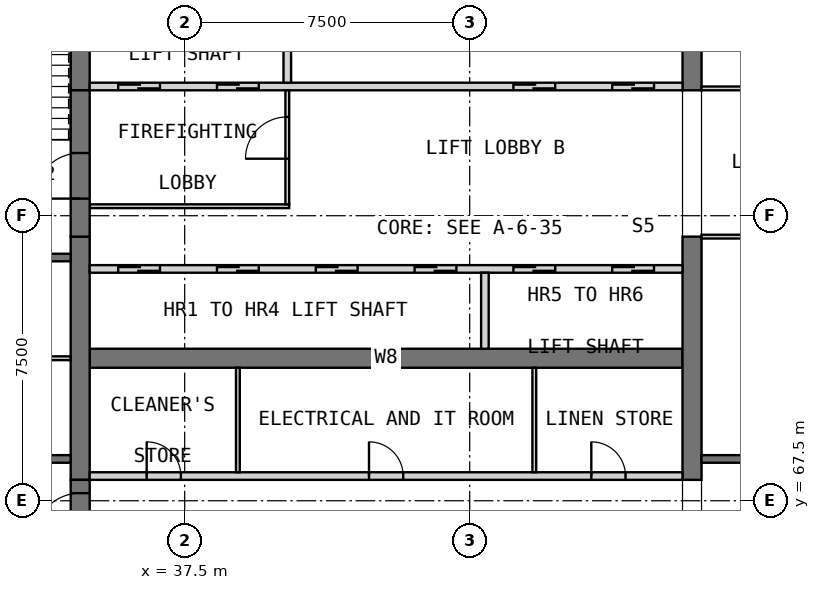
"""IFC4 building model, lengths in metres.
Left out: names, types, materials, properties, quantities, classifications, styles, units other than length and angle.
Written with IfcOpenShell. Run it as: python <this file> out.ifc"""

import sys

from ifc_helpers import new_model, si_unit, direction, frame, frame_2d, origin, place, context, subcontext, project, spatial, rectangle, extrude, element, fill, save


model = new_model("IFC4")
c1 = context("Model", 3, precision=1e-05, world=origin(), true_north=direction((0.0, 1.0)))
c2 = subcontext(c1, "Body", "Model", "MODEL_VIEW")
j1 = project(units=[si_unit("LENGTHUNIT", "METRE"), si_unit("PLANEANGLEUNIT", "RADIAN")], contexts=[c1])
p1 = place(None, origin())
s1 = spatial("IfcSite", under=j1, at=p1, CompositionType="ELEMENT")
p2 = place(p1, origin())
s2 = spatial("IfcBuilding", under=s1, at=p2, CompositionType="ELEMENT")
p3 = place(p2, frame((0.0, 0.0, 266.2)))
s3 = spatial("IfcBuildingStorey", under=s2, at=p3, CompositionType="ELEMENT", Elevation=266.2)
p4 = place(p3, frame((35.0, 71.25, 0.0), z_axis=(0.0, 0.0, 1.0), x_axis=(1.0, 0.0, 0.0)))
e1 = element("IfcWall", 1, at=p4, inside=s3, PredefinedType="SHEAR", context=c2, shape_type="SweptSolid", body=[
    extrude(rectangle(XDim=15.6, YDim=0.5, at=frame_2d((7.8, 0.0))), origin(), (0.0, 0.0, 1.0), 3.5),
])
p5 = place(p3, frame((34.75, 68.05, 0.0), z_axis=(0.0, 0.0, 1.0), x_axis=(0.0, 1.0, 0.0)))
e2 = element("IfcWall", 2, at=p5, inside=s3, PredefinedType="SHEAR", context=c2, shape_type="SweptSolid", body=[
    extrude(rectangle(XDim=6.4, YDim=0.5, at=frame_2d((3.2, 0.0))), origin(), (0.0, 0.0, 1.0), 3.5),
])
p6 = place(p3, frame((34.75, 78.3, 0.0), z_axis=(0.0, 0.0, 1.0), x_axis=(0.0, 1.0, 0.0)))
e3 = element("IfcWall", 3, at=p6, inside=s3, PredefinedType="SHEAR", context=c2, shape_type="SweptSolid", body=[
    extrude(rectangle(XDim=3.6, YDim=0.5, at=frame_2d((1.8, 0.0))), origin(), (0.0, 0.0, 1.0), 3.5),
])
p7 = place(p3, frame((50.85, 68.05, 0.0), z_axis=(0.0, 0.0, 1.0), x_axis=(0.0, 1.0, 0.0)))
e4 = element("IfcWall", 4, at=p7, inside=s3, PredefinedType="SHEAR", context=c2, shape_type="SweptSolid", body=[
    extrude(rectangle(XDim=6.4, YDim=0.5, at=frame_2d((3.2, 0.0))), origin(), (0.0, 0.0, 1.0), 3.5),
])
p8 = place(p3, frame((50.85, 78.3, 0.0), z_axis=(0.0, 0.0, 1.0), x_axis=(0.0, 1.0, 0.0)))
e5 = element("IfcWall", 5, at=p8, inside=s3, PredefinedType="SHEAR", context=c2, shape_type="SweptSolid", body=[
    extrude(rectangle(XDim=3.6, YDim=0.5, at=frame_2d((1.8, 0.0))), origin(), (0.0, 0.0, 1.0), 3.5),
])
p9 = place(p3, frame((35.0, 68.15, 0.0), z_axis=(0.0, 0.0, 1.0), x_axis=(1.0, 0.0, 0.0)))
e6 = element("IfcWall", 6, at=p9, inside=s3, PredefinedType="PARTITIONING", context=c2, shape_type="SweptSolid", body=[
    extrude(rectangle(XDim=15.6, YDim=0.2, at=frame_2d((7.8, 0.0))), origin(), (0.0, 0.0, 1.0), 3.25),
])
p10 = place(p9, frame((1.5, 0.0, 0.0)))
e7 = element("IfcOpeningElement", 7, at=p10, cuts=e6, PredefinedType="OPENING", context=c2, shape_type="SweptSolid", body=[
    extrude(rectangle(XDim=0.9, YDim=2.1, at=frame_2d((0.45, 1.05))), frame((0.0, 0.11, 0.0), z_axis=(0.0, -1.0, 0.0), x_axis=(1.0, 0.0, 0.0)), (0.0, 0.0, 1.0), 0.22),
])
p11 = place(p9, frame((7.35, 0.0, 0.0)))
e8 = element("IfcOpeningElement", 8, at=p11, cuts=e6, PredefinedType="OPENING", context=c2, shape_type="SweptSolid", body=[
    extrude(rectangle(XDim=0.9, YDim=2.1, at=frame_2d((0.45, 1.05))), frame((0.0, 0.11, 0.0), z_axis=(0.0, -1.0, 0.0), x_axis=(1.0, 0.0, 0.0)), (0.0, 0.0, 1.0), 0.22),
])
p12 = place(p9, frame((13.2, 0.0, 0.0)))
e9 = element("IfcOpeningElement", 9, at=p12, cuts=e6, PredefinedType="OPENING", context=c2, shape_type="SweptSolid", body=[
    extrude(rectangle(XDim=0.9, YDim=2.1, at=frame_2d((0.45, 1.05))), frame((0.0, 0.11, 0.0), z_axis=(0.0, -1.0, 0.0), x_axis=(1.0, 0.0, 0.0)), (0.0, 0.0, 1.0), 0.22),
])
for number, where, z_axis, x_axis in (
    (10, (38.9, 68.25, 0.0), (0.0, 0.0, 1.0), (0.0, 1.0, 0.0)),
    (11, (46.7, 68.25, 0.0), (0.0, 0.0, 1.0), (0.0, 1.0, 0.0)),
):
    element("IfcWall", number, at=place(p3, frame(where, z_axis=z_axis, x_axis=x_axis)), inside=s3, PredefinedType="PARTITIONING", context=c2, shape_type="SweptSolid", body=[
        extrude(rectangle(XDim=2.75, YDim=0.1, at=frame_2d((1.375, 0.0))), origin(), (0.0, 0.0, 1.0), 3.25),
    ])
p13 = place(p3, frame((35.0, 73.6, 0.0), z_axis=(0.0, 0.0, 1.0), x_axis=(1.0, 0.0, 0.0)))
e12 = element("IfcWall", 12, at=p13, inside=s3, PredefinedType="SOLIDWALL", context=c2, shape_type="SweptSolid", body=[
    extrude(rectangle(XDim=15.6, YDim=0.2, at=frame_2d((7.8, 0.0))), origin(), (0.0, 0.0, 1.0), 3.5),
])
p14 = place(p13, frame((0.75, 0.0, 0.0)))
e13 = element("IfcOpeningElement", 13, at=p14, cuts=e12, PredefinedType="OPENING", context=c2, shape_type="SweptSolid", body=[
    extrude(rectangle(XDim=1.1, YDim=2.1, at=frame_2d((0.55, 1.05))), frame((0.0, 0.11, 0.0), z_axis=(0.0, -1.0, 0.0), x_axis=(1.0, 0.0, 0.0)), (0.0, 0.0, 1.0), 0.22),
])
p15 = place(p13, frame((3.35, 0.0, 0.0)))
e14 = element("IfcOpeningElement", 14, at=p15, cuts=e12, PredefinedType="OPENING", context=c2, shape_type="SweptSolid", body=[
    extrude(rectangle(XDim=1.1, YDim=2.1, at=frame_2d((0.55, 1.05))), frame((0.0, 0.11, 0.0), z_axis=(0.0, -1.0, 0.0), x_axis=(1.0, 0.0, 0.0)), (0.0, 0.0, 1.0), 0.22),
])
p16 = place(p13, frame((5.95, 0.0, 0.0)))
e15 = element("IfcOpeningElement", 15, at=p16, cuts=e12, PredefinedType="OPENING", context=c2, shape_type="SweptSolid", body=[
    extrude(rectangle(XDim=1.1, YDim=2.1, at=frame_2d((0.55, 1.05))), frame((0.0, 0.11, 0.0), z_axis=(0.0, -1.0, 0.0), x_axis=(1.0, 0.0, 0.0)), (0.0, 0.0, 1.0), 0.22),
])
p17 = place(p13, frame((8.55, 0.0, 0.0)))
e16 = element("IfcOpeningElement", 16, at=p17, cuts=e12, PredefinedType="OPENING", context=c2, shape_type="SweptSolid", body=[
    extrude(rectangle(XDim=1.1, YDim=2.1, at=frame_2d((0.55, 1.05))), frame((0.0, 0.11, 0.0), z_axis=(0.0, -1.0, 0.0), x_axis=(1.0, 0.0, 0.0)), (0.0, 0.0, 1.0), 0.22),
])
p18 = place(p13, frame((11.15, 0.0, 0.0)))
e17 = element("IfcOpeningElement", 17, at=p18, cuts=e12, PredefinedType="OPENING", context=c2, shape_type="SweptSolid", body=[
    extrude(rectangle(XDim=1.1, YDim=2.1, at=frame_2d((0.55, 1.05))), frame((0.0, 0.11, 0.0), z_axis=(0.0, -1.0, 0.0), x_axis=(1.0, 0.0, 0.0)), (0.0, 0.0, 1.0), 0.22),
])
p19 = place(p13, frame((13.75, 0.0, 0.0)))
e18 = element("IfcOpeningElement", 18, at=p19, cuts=e12, PredefinedType="OPENING", context=c2, shape_type="SweptSolid", body=[
    extrude(rectangle(XDim=1.1, YDim=2.1, at=frame_2d((0.55, 1.05))), frame((0.0, 0.11, 0.0), z_axis=(0.0, -1.0, 0.0), x_axis=(1.0, 0.0, 0.0)), (0.0, 0.0, 1.0), 0.22),
])
p20 = place(p3, frame((45.4, 71.5, 0.0), z_axis=(0.0, 0.0, 1.0), x_axis=(0.0, 1.0, 0.0)))
e19 = element("IfcWall", 19, at=p20, inside=s3, PredefinedType="SOLIDWALL", context=c2, shape_type="SweptSolid", body=[
    extrude(rectangle(XDim=2.0, YDim=0.2, at=frame_2d((1.0, 0.0))), origin(), (0.0, 0.0, 1.0), 3.5),
])
p21 = place(p3, frame((35.0, 78.4, 0.0), z_axis=(0.0, 0.0, 1.0), x_axis=(1.0, 0.0, 0.0)))
e20 = element("IfcWall", 20, at=p21, inside=s3, PredefinedType="SOLIDWALL", context=c2, shape_type="SweptSolid", body=[
    extrude(rectangle(XDim=15.6, YDim=0.2, at=frame_2d((7.8, 0.0))), origin(), (0.0, 0.0, 1.0), 3.5),
])
p22 = place(p21, frame((0.75, 0.0, 0.0)))
e21 = element("IfcOpeningElement", 21, at=p22, cuts=e20, PredefinedType="OPENING", context=c2, shape_type="SweptSolid", body=[
    extrude(rectangle(XDim=1.1, YDim=2.1, at=frame_2d((0.55, 1.05))), frame((0.0, 0.11, 0.0), z_axis=(0.0, -1.0, 0.0), x_axis=(1.0, 0.0, 0.0)), (0.0, 0.0, 1.0), 0.22),
])
p23 = place(p21, frame((3.35, 0.0, 0.0)))
e22 = element("IfcOpeningElement", 22, at=p23, cuts=e20, PredefinedType="OPENING", context=c2, shape_type="SweptSolid", body=[
    extrude(rectangle(XDim=1.1, YDim=2.1, at=frame_2d((0.55, 1.05))), frame((0.0, 0.11, 0.0), z_axis=(0.0, -1.0, 0.0), x_axis=(1.0, 0.0, 0.0)), (0.0, 0.0, 1.0), 0.22),
])
p24 = place(p21, frame((11.15, 0.0, 0.0)))
e23 = element("IfcOpeningElement", 23, at=p24, cuts=e20, PredefinedType="OPENING", context=c2, shape_type="SweptSolid", body=[
    extrude(rectangle(XDim=1.1, YDim=2.1, at=frame_2d((0.55, 1.05))), frame((0.0, 0.11, 0.0), z_axis=(0.0, -1.0, 0.0), x_axis=(1.0, 0.0, 0.0)), (0.0, 0.0, 1.0), 0.22),
])
p25 = place(p21, frame((13.75, 0.0, 0.0)))
e24 = element("IfcOpeningElement", 24, at=p25, cuts=e20, PredefinedType="OPENING", context=c2, shape_type="SweptSolid", body=[
    extrude(rectangle(XDim=1.1, YDim=2.1, at=frame_2d((0.55, 1.05))), frame((0.0, 0.11, 0.0), z_axis=(0.0, -1.0, 0.0), x_axis=(1.0, 0.0, 0.0)), (0.0, 0.0, 1.0), 0.22),
])
p26 = place(p3, frame((40.2, 78.5, 0.0), z_axis=(0.0, 0.0, 1.0), x_axis=(0.0, 1.0, 0.0)))
e25 = element("IfcWall", 25, at=p26, inside=s3, PredefinedType="SOLIDWALL", context=c2, shape_type="SweptSolid", body=[
    extrude(rectangle(XDim=3.4, YDim=0.2, at=frame_2d((1.7, 0.0))), origin(), (0.0, 0.0, 1.0), 3.5),
])
p27 = place(p3, frame((35.0, 75.25, 0.0), z_axis=(0.0, 0.0, 1.0), x_axis=(1.0, 0.0, 0.0)))
e26 = element("IfcWall", 26, at=p27, inside=s3, PredefinedType="PARTITIONING", context=c2, shape_type="SweptSolid", body=[
    extrude(rectangle(XDim=5.25, YDim=0.1, at=frame_2d((2.625, 0.0))), origin(), (0.0, 0.0, 1.0), 3.25),
])
p28 = place(p3, frame((40.2, 75.3, 0.0), z_axis=(0.0, 0.0, 1.0), x_axis=(0.0, 1.0, 0.0)))
e27 = element("IfcWall", 27, at=p28, inside=s3, PredefinedType="PARTITIONING", context=c2, shape_type="SweptSolid", body=[
    extrude(rectangle(XDim=3.0, YDim=0.1, at=frame_2d((1.5, 0.0))), origin(), (0.0, 0.0, 1.0), 3.25),
])
p29 = place(p28, frame((1.2, 0.0, 0.0)))
e28 = element("IfcOpeningElement", 28, at=p29, cuts=e27, PredefinedType="OPENING", context=c2, shape_type="SweptSolid", body=[
    extrude(rectangle(XDim=1.1, YDim=2.1, at=frame_2d((0.55, 1.05))), frame((0.0, 0.06, 0.0), z_axis=(0.0, -1.0, 0.0), x_axis=(1.0, 0.0, 0.0)), (0.0, 0.0, 1.0), 0.12),
])
p30 = place(p3, frame((34.75, 64.2, 0.0), z_axis=(0.0, 0.0, 1.0), x_axis=(0.0, 1.0, 0.0)))
e29 = element("IfcWall", 29, at=p30, inside=s3, PredefinedType="SOLIDWALL", context=c2, shape_type="SweptSolid", body=[
    extrude(rectangle(XDim=3.85, YDim=0.5, at=frame_2d((1.925, 0.0))), origin(), (0.0, 0.0, 1.0), 2.3),
])
p31 = place(p30, frame((2.3, 0.0, 0.0)))
e30 = element("IfcOpeningElement", 30, at=p31, cuts=e29, PredefinedType="OPENING", context=c2, shape_type="SweptSolid", body=[
    extrude(rectangle(XDim=1.2, YDim=2.1, at=frame_2d((0.6, 1.05))), frame((0.0, 0.26, 0.0), z_axis=(0.0, -1.0, 0.0), x_axis=(1.0, 0.0, 0.0)), (0.0, 0.0, 1.0), 0.52),
])
p32 = place(p3, frame((34.75, 74.45, 0.0), z_axis=(0.0, 0.0, 1.0), x_axis=(0.0, 1.0, 0.0)))
e31 = element("IfcWall", 31, at=p32, inside=s3, PredefinedType="SOLIDWALL", context=c2, shape_type="SweptSolid", body=[
    extrude(rectangle(XDim=3.85, YDim=0.5, at=frame_2d((1.925, 0.0))), origin(), (0.0, 0.0, 1.0), 2.3),
])
p33 = place(p32, frame((1.0, 0.0, 0.0)))
e32 = element("IfcOpeningElement", 32, at=p33, cuts=e31, PredefinedType="OPENING", context=c2, shape_type="SweptSolid", body=[
    extrude(rectangle(XDim=1.2, YDim=2.1, at=frame_2d((0.6, 1.05))), frame((0.0, 0.26, 0.0), z_axis=(0.0, -1.0, 0.0), x_axis=(1.0, 0.0, 0.0)), (0.0, 0.0, 1.0), 0.52),
])
p34 = place(p3, frame((30.6, 68.6, 0.0), z_axis=(0.0, 0.0, 1.0), x_axis=(1.0, 0.0, 0.0)))
e33 = element("IfcWall", 33, at=p34, inside=s3, PredefinedType="SOLIDWALL", context=c2, shape_type="SweptSolid", body=[
    extrude(rectangle(XDim=3.9, YDim=0.2, at=frame_2d((1.95, 0.0))), origin(), (0.0, 0.0, 1.0), 3.25),
])
p35 = place(p34, frame((1.7, 0.0, 0.0)))
e34 = element("IfcOpeningElement", 34, at=p35, cuts=e33, PredefinedType="OPENING", context=c2, shape_type="SweptSolid", body=[
    extrude(rectangle(XDim=0.9, YDim=2.1, at=frame_2d((0.45, 1.05))), frame((0.0, 0.11, 0.0), z_axis=(0.0, -1.0, 0.0), x_axis=(1.0, 0.0, 0.0)), (0.0, 0.0, 1.0), 0.22),
])
p36 = place(p3, frame((30.6, 73.9, 0.0), z_axis=(0.0, 0.0, 1.0), x_axis=(1.0, 0.0, 0.0)))
e35 = element("IfcWall", 35, at=p36, inside=s3, PredefinedType="SOLIDWALL", context=c2, shape_type="SweptSolid", body=[
    extrude(rectangle(XDim=3.9, YDim=0.2, at=frame_2d((1.95, 0.0))), origin(), (0.0, 0.0, 1.0), 3.25),
])
p37 = place(p36, frame((1.7, 0.0, 0.0)))
e36 = element("IfcOpeningElement", 36, at=p37, cuts=e35, PredefinedType="OPENING", context=c2, shape_type="SweptSolid", body=[
    extrude(rectangle(XDim=0.9, YDim=2.1, at=frame_2d((0.45, 1.05))), frame((0.0, 0.11, 0.0), z_axis=(0.0, -1.0, 0.0), x_axis=(1.0, 0.0, 0.0)), (0.0, 0.0, 1.0), 0.22),
])
p38 = place(p3, frame((51.1, 68.6, 0.0), z_axis=(0.0, 0.0, 1.0), x_axis=(1.0, 0.0, 0.0)))
e37 = element("IfcWall", 37, at=p38, inside=s3, PredefinedType="SOLIDWALL", context=c2, shape_type="SweptSolid", body=[
    extrude(rectangle(XDim=8.3, YDim=0.2, at=frame_2d((4.15, 0.0))), origin(), (0.0, 0.0, 1.0), 3.25),
])
p39 = place(p3, frame((30.6, 71.25, 0.0), z_axis=(0.0, 0.0, 1.0), x_axis=(1.0, 0.0, 0.0)))
e38 = element("IfcWall", 38, at=p39, inside=s3, PredefinedType="PARTITIONING", context=c2, shape_type="SweptSolid", body=[
    extrude(rectangle(XDim=3.9, YDim=0.1, at=frame_2d((1.95, 0.0))), origin(), (0.0, 0.0, 1.0), 3.25),
])
p40 = place(p3, frame((51.1, 74.45, 0.0), z_axis=(0.0, 0.0, 1.0), x_axis=(1.0, 0.0, 0.0)))
e39 = element("IfcWall", 39, at=p40, inside=s3, PredefinedType="PARTITIONING", context=c2, shape_type="SweptSolid", body=[
    extrude(rectangle(XDim=8.3, YDim=0.1, at=frame_2d((4.15, 0.0))), origin(), (0.0, 0.0, 1.0), 3.25),
])
p41 = place(p40, frame((3.7, 0.0, 0.0)))
e40 = element("IfcOpeningElement", 40, at=p41, cuts=e39, PredefinedType="OPENING", context=c2, shape_type="SweptSolid", body=[
    extrude(rectangle(XDim=0.9, YDim=2.1, at=frame_2d((0.45, 1.05))), frame((0.0, 0.06, 0.0), z_axis=(0.0, -1.0, 0.0), x_axis=(1.0, 0.0, 0.0)), (0.0, 0.0, 1.0), 0.12),
])
p42 = place(p3, frame((51.1, 78.35, 0.0), z_axis=(0.0, 0.0, 1.0), x_axis=(1.0, 0.0, 0.0)))
e41 = element("IfcWall", 41, at=p42, inside=s3, PredefinedType="PARTITIONING", context=c2, shape_type="SweptSolid", body=[
    extrude(rectangle(XDim=8.3, YDim=0.1, at=frame_2d((4.15, 0.0))), origin(), (0.0, 0.0, 1.0), 3.25),
])
p43 = place(p42, frame((3.7, 0.0, 0.0)))
e42 = element("IfcOpeningElement", 42, at=p43, cuts=e41, PredefinedType="OPENING", context=c2, shape_type="SweptSolid", body=[
    extrude(rectangle(XDim=0.9, YDim=2.1, at=frame_2d((0.45, 1.05))), frame((0.0, 0.06, 0.0), z_axis=(0.0, -1.0, 0.0), x_axis=(1.0, 0.0, 0.0)), (0.0, 0.0, 1.0), 0.12),
])
p44 = place(p10, origin())
e43 = element("IfcDoor", 43, at=p44, inside=s3, OperationType="SINGLE_SWING_RIGHT", PredefinedType="DOOR", context=c2, shape_type="SweptSolid", body=[
    extrude(rectangle(XDim=0.9, YDim=2.1, at=frame_2d((0.45, 1.05))), frame((0.0, 0.025, 0.0), z_axis=(0.0, -1.0, 0.0), x_axis=(1.0, 0.0, 0.0)), (0.0, 0.0, 1.0), 0.05),
])
fill(e7, e43)
p45 = place(p11, origin())
e44 = element("IfcDoor", 44, at=p45, inside=s3, OperationType="SINGLE_SWING_LEFT", PredefinedType="DOOR", context=c2, shape_type="SweptSolid", body=[
    extrude(rectangle(XDim=0.9, YDim=2.1, at=frame_2d((0.45, 1.05))), frame((0.0, 0.025, 0.0), z_axis=(0.0, -1.0, 0.0), x_axis=(1.0, 0.0, 0.0)), (0.0, 0.0, 1.0), 0.05),
])
fill(e8, e44)
p46 = place(p12, origin())
e45 = element("IfcDoor", 45, at=p46, inside=s3, OperationType="SINGLE_SWING_RIGHT", PredefinedType="DOOR", context=c2, shape_type="SweptSolid", body=[
    extrude(rectangle(XDim=0.9, YDim=2.1, at=frame_2d((0.45, 1.05))), frame((0.0, 0.025, 0.0), z_axis=(0.0, -1.0, 0.0), x_axis=(1.0, 0.0, 0.0)), (0.0, 0.0, 1.0), 0.05),
])
fill(e9, e45)
p47 = place(p14, origin())
e46 = element("IfcDoor", 46, at=p47, inside=s3, OperationType="DOUBLE_DOOR_SLIDING", PredefinedType="DOOR", context=c2, shape_type="SweptSolid", body=[
    extrude(rectangle(XDim=1.1, YDim=2.1, at=frame_2d((0.55, 1.05))), frame((0.0, 0.025, 0.0), z_axis=(0.0, -1.0, 0.0), x_axis=(1.0, 0.0, 0.0)), (0.0, 0.0, 1.0), 0.05),
])
fill(e13, e46)
p48 = place(p15, origin())
e47 = element("IfcDoor", 47, at=p48, inside=s3, OperationType="DOUBLE_DOOR_SLIDING", PredefinedType="DOOR", context=c2, shape_type="SweptSolid", body=[
    extrude(rectangle(XDim=1.1, YDim=2.1, at=frame_2d((0.55, 1.05))), frame((0.0, 0.025, 0.0), z_axis=(0.0, -1.0, 0.0), x_axis=(1.0, 0.0, 0.0)), (0.0, 0.0, 1.0), 0.05),
])
fill(e14, e47)
p49 = place(p16, origin())
e48 = element("IfcDoor", 48, at=p49, inside=s3, OperationType="DOUBLE_DOOR_SLIDING", PredefinedType="DOOR", context=c2, shape_type="SweptSolid", body=[
    extrude(rectangle(XDim=1.1, YDim=2.1, at=frame_2d((0.55, 1.05))), frame((0.0, 0.025, 0.0), z_axis=(0.0, -1.0, 0.0), x_axis=(1.0, 0.0, 0.0)), (0.0, 0.0, 1.0), 0.05),
])
fill(e15, e48)
p50 = place(p17, origin())
e49 = element("IfcDoor", 49, at=p50, inside=s3, OperationType="DOUBLE_DOOR_SLIDING", PredefinedType="DOOR", context=c2, shape_type="SweptSolid", body=[
    extrude(rectangle(XDim=1.1, YDim=2.1, at=frame_2d((0.55, 1.05))), frame((0.0, 0.025, 0.0), z_axis=(0.0, -1.0, 0.0), x_axis=(1.0, 0.0, 0.0)), (0.0, 0.0, 1.0), 0.05),
])
fill(e16, e49)
p51 = place(p18, origin())
e50 = element("IfcDoor", 50, at=p51, inside=s3, OperationType="DOUBLE_DOOR_SLIDING", PredefinedType="DOOR", context=c2, shape_type="SweptSolid", body=[
    extrude(rectangle(XDim=1.1, YDim=2.1, at=frame_2d((0.55, 1.05))), frame((0.0, 0.025, 0.0), z_axis=(0.0, -1.0, 0.0), x_axis=(1.0, 0.0, 0.0)), (0.0, 0.0, 1.0), 0.05),
])
fill(e17, e50)
p52 = place(p19, origin())
e51 = element("IfcDoor", 51, at=p52, inside=s3, OperationType="DOUBLE_DOOR_SLIDING", PredefinedType="DOOR", context=c2, shape_type="SweptSolid", body=[
    extrude(rectangle(XDim=1.1, YDim=2.1, at=frame_2d((0.55, 1.05))), frame((0.0, 0.025, 0.0), z_axis=(0.0, -1.0, 0.0), x_axis=(1.0, 0.0, 0.0)), (0.0, 0.0, 1.0), 0.05),
])
fill(e18, e51)
p53 = place(p22, origin())
e52 = element("IfcDoor", 52, at=p53, inside=s3, OperationType="DOUBLE_DOOR_SLIDING", PredefinedType="DOOR", context=c2, shape_type="SweptSolid", body=[
    extrude(rectangle(XDim=1.1, YDim=2.1, at=frame_2d((0.55, 1.05))), frame((0.0, 0.025, 0.0), z_axis=(0.0, -1.0, 0.0), x_axis=(1.0, 0.0, 0.0)), (0.0, 0.0, 1.0), 0.05),
])
fill(e21, e52)
p54 = place(p23, origin())
e53 = element("IfcDoor", 53, at=p54, inside=s3, OperationType="DOUBLE_DOOR_SLIDING", PredefinedType="DOOR", context=c2, shape_type="SweptSolid", body=[
    extrude(rectangle(XDim=1.1, YDim=2.1, at=frame_2d((0.55, 1.05))), frame((0.0, 0.025, 0.0), z_axis=(0.0, -1.0, 0.0), x_axis=(1.0, 0.0, 0.0)), (0.0, 0.0, 1.0), 0.05),
])
fill(e22, e53)
p55 = place(p24, origin())
e54 = element("IfcDoor", 54, at=p55, inside=s3, OperationType="DOUBLE_DOOR_SLIDING", PredefinedType="DOOR", context=c2, shape_type="SweptSolid", body=[
    extrude(rectangle(XDim=1.1, YDim=2.1, at=frame_2d((0.55, 1.05))), frame((0.0, 0.025, 0.0), z_axis=(0.0, -1.0, 0.0), x_axis=(1.0, 0.0, 0.0)), (0.0, 0.0, 1.0), 0.05),
])
fill(e23, e54)
p56 = place(p25, origin())
e55 = element("IfcDoor", 55, at=p56, inside=s3, OperationType="DOUBLE_DOOR_SLIDING", PredefinedType="DOOR", context=c2, shape_type="SweptSolid", body=[
    extrude(rectangle(XDim=1.1, YDim=2.1, at=frame_2d((0.55, 1.05))), frame((0.0, 0.025, 0.0), z_axis=(0.0, -1.0, 0.0), x_axis=(1.0, 0.0, 0.0)), (0.0, 0.0, 1.0), 0.05),
])
fill(e24, e55)
p57 = place(p29, origin())
e56 = element("IfcDoor", 56, at=p57, inside=s3, OperationType="SINGLE_SWING_LEFT", PredefinedType="DOOR", context=c2, shape_type="SweptSolid", body=[
    extrude(rectangle(XDim=1.1, YDim=2.1, at=frame_2d((0.55, 1.05))), frame((0.0, 0.025, 0.0), z_axis=(0.0, -1.0, 0.0), x_axis=(1.0, 0.0, 0.0)), (0.0, 0.0, 1.0), 0.05),
])
fill(e28, e56)
p58 = place(p31, origin())
e57 = element("IfcDoor", 57, at=p58, inside=s3, OperationType="SINGLE_SWING_LEFT", PredefinedType="DOOR", context=c2, shape_type="SweptSolid", body=[
    extrude(rectangle(XDim=1.2, YDim=2.1, at=frame_2d((0.6, 1.05))), frame((0.0, 0.025, 0.0), z_axis=(0.0, -1.0, 0.0), x_axis=(1.0, 0.0, 0.0)), (0.0, 0.0, 1.0), 0.05),
])
fill(e30, e57)
p59 = place(p33, origin())
e58 = element("IfcDoor", 58, at=p59, inside=s3, OperationType="SINGLE_SWING_RIGHT", PredefinedType="DOOR", context=c2, shape_type="SweptSolid", body=[
    extrude(rectangle(XDim=1.2, YDim=2.1, at=frame_2d((0.6, 1.05))), frame((0.0, 0.025, 0.0), z_axis=(0.0, -1.0, 0.0), x_axis=(1.0, 0.0, 0.0)), (0.0, 0.0, 1.0), 0.05),
])
fill(e32, e58)
save(model, sys.argv[1])
